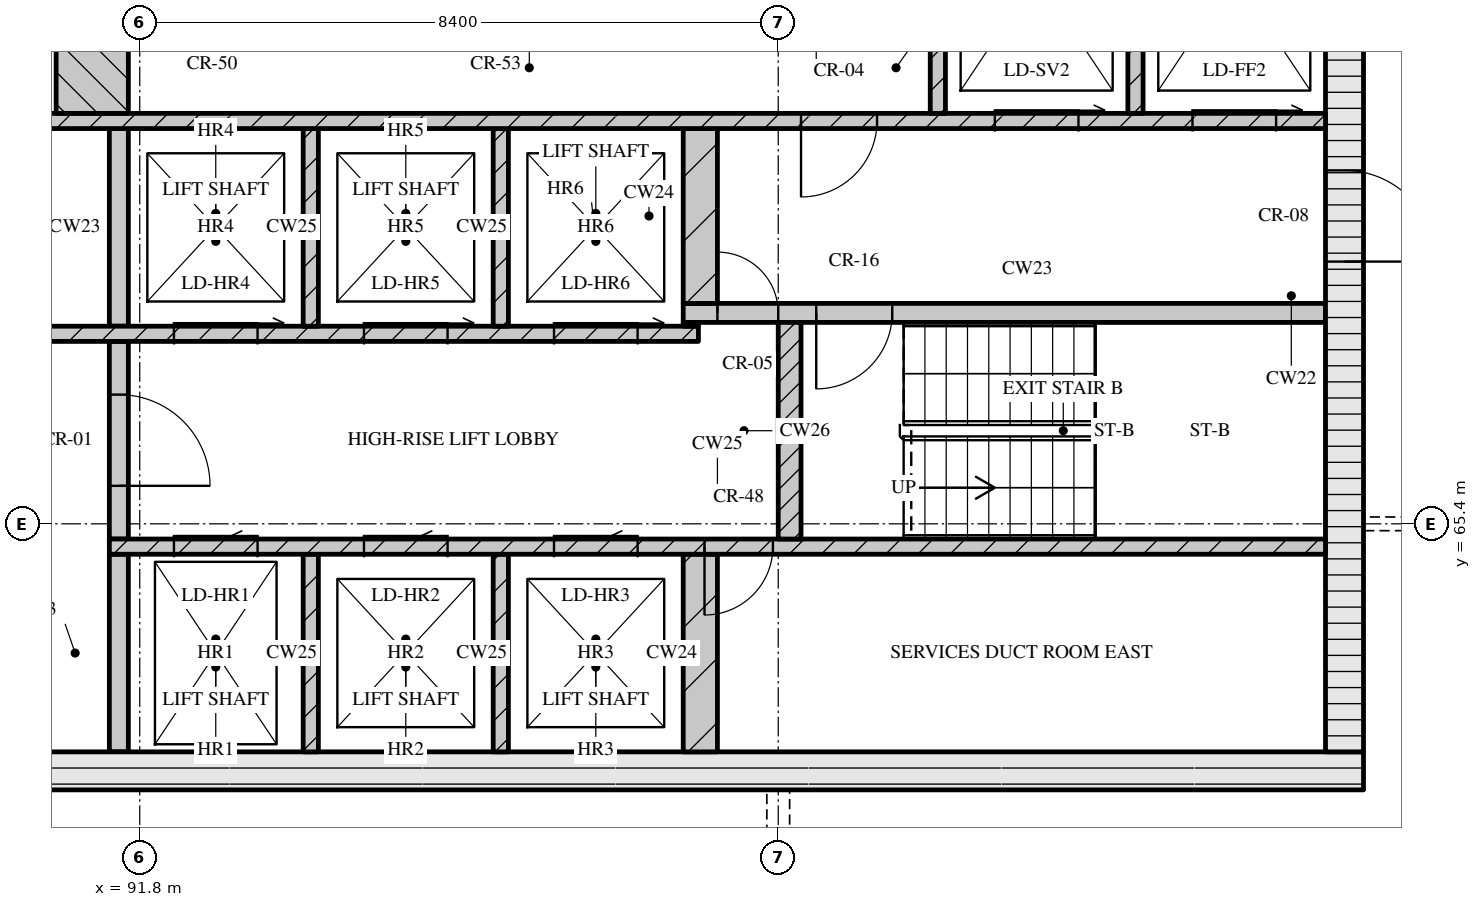
"""IFC4 building model, lengths in metres.
Left out: names, types, materials, properties, quantities, classifications, styles, units other than length and angle.
Written with IfcOpenShell. Run it as: python <this file> out.ifc"""

import sys

from ifc_helpers import new_model, si_unit, direction, frame, frame_2d, origin, place, context, subcontext, project, spatial, rectangle, extrude, element, fill, save


model = new_model("IFC4")
c1 = context("Model", 3, precision=1e-05, world=origin(), true_north=direction((0.0, 1.0)))
c2 = subcontext(c1, "Body", "Model", "MODEL_VIEW")
j1 = project(units=[si_unit("LENGTHUNIT", "METRE"), si_unit("PLANEANGLEUNIT", "RADIAN")], contexts=[c1])
p1 = place(None, origin())
s1 = spatial("IfcSite", under=j1, at=p1, CompositionType="ELEMENT")
p2 = place(p1, origin())
s2 = spatial("IfcBuilding", under=s1, at=p2, CompositionType="ELEMENT")
p3 = place(p2, frame((0.0, 0.0, 270.75)))
s3 = spatial("IfcBuildingStorey", under=s2, at=p3, CompositionType="ELEMENT", Elevation=270.75)
p4 = place(p3, frame((67.3, 62.15, 0.0), z_axis=(0.0, 0.0, 1.0), x_axis=(1.0, 0.0, 0.0)))
e1 = element("IfcWall", 1, at=p4, inside=s3, PredefinedType="SOLIDWALL", context=c2, shape_type="SweptSolid", body=[
    extrude(rectangle(XDim=40.6, YDim=0.5, at=frame_2d((20.3, 0.0))), origin(), (0.0, 0.0, 1.0), 3.32),
])
p5 = place(p4, frame((20.65, 0.0, 0.0)))
e2 = element("IfcOpeningElement", 2, at=p5, cuts=e1, PredefinedType="OPENING", context=c2, shape_type="SweptSolid", body=[
    extrude(rectangle(XDim=1.8, YDim=2.1, at=frame_2d((0.9, 1.05))), frame((0.0, 0.26, 0.0), z_axis=(0.0, -1.0, 0.0), x_axis=(1.0, 0.0, 0.0)), (0.0, 0.0, 1.0), 0.52),
])
p6 = place(p3, frame((107.65, 62.4, 0.0), z_axis=(0.0, 0.0, 1.0), x_axis=(0.0, 1.0, 0.0)))
e3 = element("IfcWall", 3, at=p6, inside=s3, PredefinedType="SOLIDWALL", context=c2, shape_type="SweptSolid", body=[
    extrude(rectangle(XDim=12.0, YDim=0.5, at=frame_2d((6.0, 0.0))), origin(), (0.0, 0.0, 1.0), 3.32),
])
p7 = place(p6, frame((6.45, 0.0, 0.0)))
e4 = element("IfcOpeningElement", 4, at=p7, cuts=e3, PredefinedType="OPENING", context=c2, shape_type="SweptSolid", body=[
    extrude(rectangle(XDim=1.2, YDim=2.1, at=frame_2d((0.6, 1.05))), frame((0.0, 0.26, 0.0), z_axis=(0.0, -1.0, 0.0), x_axis=(1.0, 0.0, 0.0)), (0.0, 0.0, 1.0), 0.52),
])
p8 = place(p3, frame((91.525, 62.4, 0.0), z_axis=(0.0, 0.0, 1.0), x_axis=(0.0, 1.0, 0.0)))
e5 = element("IfcWall", 5, at=p8, inside=s3, PredefinedType="SOLIDWALL", context=c2, shape_type="SweptSolid", body=[
    extrude(rectangle(XDim=2.6, YDim=0.25, at=frame_2d((1.3, 0.0))), origin(), (0.0, 0.0, 1.0), 3.32),
])
for number, where, z_axis, x_axis in (
    (6, (94.05, 62.4, 0.0), (0.0, 0.0, 1.0), (0.0, 1.0, 0.0)),
    (7, (96.55, 62.4, 0.0), (0.0, 0.0, 1.0), (0.0, 1.0, 0.0)),
):
    element("IfcWall", number, at=place(p3, frame(where, z_axis=z_axis, x_axis=x_axis)), inside=s3, PredefinedType="SOLIDWALL", context=c2, shape_type="SweptSolid", body=[
        extrude(rectangle(XDim=2.6, YDim=0.2, at=frame_2d((1.3, 0.0))), origin(), (0.0, 0.0, 1.0), 3.32),
    ])
p9 = place(p3, frame((99.175, 62.4, 0.0), z_axis=(0.0, 0.0, 1.0), x_axis=(0.0, 1.0, 0.0)))
e8 = element("IfcWall", 8, at=p9, inside=s3, PredefinedType="SOLIDWALL", context=c2, shape_type="SweptSolid", body=[
    extrude(rectangle(XDim=2.6, YDim=0.45, at=frame_2d((1.3, 0.0))), origin(), (0.0, 0.0, 1.0), 3.32),
])
p10 = place(p3, frame((91.4, 65.1, 0.0), z_axis=(0.0, 0.0, 1.0), x_axis=(1.0, 0.0, 0.0)))
e9 = element("IfcWall", 9, at=p10, inside=s3, PredefinedType="SOLIDWALL", context=c2, shape_type="SweptSolid", body=[
    extrude(rectangle(XDim=16.0, YDim=0.2, at=frame_2d((8.0, 0.0))), origin(), (0.0, 0.0, 1.0), 3.32),
])
p11 = place(p10, frame((0.85, 0.0, 0.0)))
e10 = element("IfcOpeningElement", 10, at=p11, cuts=e9, PredefinedType="OPENING", context=c2, shape_type="SweptSolid", body=[
    extrude(rectangle(XDim=1.1, YDim=2.1, at=frame_2d((0.55, 1.05))), frame((0.0, 0.11, 0.0), z_axis=(0.0, -1.0, 0.0), x_axis=(1.0, 0.0, 0.0)), (0.0, 0.0, 1.0), 0.22),
])
p12 = place(p10, frame((3.35, 0.0, 0.0)))
e11 = element("IfcOpeningElement", 11, at=p12, cuts=e9, PredefinedType="OPENING", context=c2, shape_type="SweptSolid", body=[
    extrude(rectangle(XDim=1.1, YDim=2.1, at=frame_2d((0.55, 1.05))), frame((0.0, 0.11, 0.0), z_axis=(0.0, -1.0, 0.0), x_axis=(1.0, 0.0, 0.0)), (0.0, 0.0, 1.0), 0.22),
])
p13 = place(p10, frame((5.85, 0.0, 0.0)))
e12 = element("IfcOpeningElement", 12, at=p13, cuts=e9, PredefinedType="OPENING", context=c2, shape_type="SweptSolid", body=[
    extrude(rectangle(XDim=1.1, YDim=2.1, at=frame_2d((0.55, 1.05))), frame((0.0, 0.11, 0.0), z_axis=(0.0, -1.0, 0.0), x_axis=(1.0, 0.0, 0.0)), (0.0, 0.0, 1.0), 0.22),
])
p14 = place(p10, frame((7.83, 0.0, 0.0)))
e13 = element("IfcOpeningElement", 13, at=p14, cuts=e9, PredefinedType="OPENING", context=c2, shape_type="SweptSolid", body=[
    extrude(rectangle(XDim=0.9, YDim=2.1, at=frame_2d((0.45, 1.05))), frame((0.0, 0.11, 0.0), z_axis=(0.0, -1.0, 0.0), x_axis=(1.0, 0.0, 0.0)), (0.0, 0.0, 1.0), 0.22),
])
p15 = place(p3, frame((91.525, 65.2, 0.0), z_axis=(0.0, 0.0, 1.0), x_axis=(0.0, 1.0, 0.0)))
e14 = element("IfcWall", 14, at=p15, inside=s3, PredefinedType="SOLIDWALL", context=c2, shape_type="SweptSolid", body=[
    extrude(rectangle(XDim=2.6, YDim=0.25, at=frame_2d((1.3, 0.0))), origin(), (0.0, 0.0, 1.0), 3.32),
])
p16 = place(p15, frame((0.7, 0.0, 0.0)))
e15 = element("IfcOpeningElement", 15, at=p16, cuts=e14, PredefinedType="OPENING", context=c2, shape_type="SweptSolid", body=[
    extrude(rectangle(XDim=1.2, YDim=2.1, at=frame_2d((0.6, 1.05))), frame((0.0, 0.135, 0.0), z_axis=(0.0, -1.0, 0.0), x_axis=(1.0, 0.0, 0.0)), (0.0, 0.0, 1.0), 0.27),
])
p17 = place(p3, frame((100.35, 65.2, 0.0), z_axis=(0.0, 0.0, 1.0), x_axis=(0.0, 1.0, 0.0)))
e16 = element("IfcWall", 16, at=p17, inside=s3, PredefinedType="SOLIDWALL", context=c2, shape_type="SweptSolid", body=[
    extrude(rectangle(XDim=2.85, YDim=0.3, at=frame_2d((1.425, 0.0))), origin(), (0.0, 0.0, 1.0), 3.32),
])
p18 = place(p3, frame((76.05, 67.9, 0.0), z_axis=(0.0, 0.0, 1.0), x_axis=(1.0, 0.0, 0.0)))
e17 = element("IfcWall", 17, at=p18, inside=s3, PredefinedType="SOLIDWALL", context=c2, shape_type="SweptSolid", body=[
    extrude(rectangle(XDim=23.1, YDim=0.2, at=frame_2d((11.55, 0.0))), origin(), (0.0, 0.0, 1.0), 3.32),
])
p19 = place(p18, frame((3.2, 0.0, 0.0)))
e18 = element("IfcOpeningElement", 18, at=p19, cuts=e17, PredefinedType="OPENING", context=c2, shape_type="SweptSolid", body=[
    extrude(rectangle(XDim=0.9, YDim=2.1, at=frame_2d((0.45, 1.05))), frame((0.0, 0.11, 0.0), z_axis=(0.0, -1.0, 0.0), x_axis=(1.0, 0.0, 0.0)), (0.0, 0.0, 1.0), 0.22),
])
p20 = place(p18, frame((9.7, 0.0, 0.0)))
e19 = element("IfcOpeningElement", 19, at=p20, cuts=e17, PredefinedType="OPENING", context=c2, shape_type="SweptSolid", body=[
    extrude(rectangle(XDim=0.9, YDim=2.1, at=frame_2d((0.45, 1.05))), frame((0.0, 0.11, 0.0), z_axis=(0.0, -1.0, 0.0), x_axis=(1.0, 0.0, 0.0)), (0.0, 0.0, 1.0), 0.22),
])
p21 = place(p18, frame((13.55, 0.0, 0.0)))
e20 = element("IfcOpeningElement", 20, at=p21, cuts=e17, PredefinedType="OPENING", context=c2, shape_type="SweptSolid", body=[
    extrude(rectangle(XDim=1.0, YDim=2.1, at=frame_2d((0.5, 1.05))), frame((0.0, 0.11, 0.0), z_axis=(0.0, -1.0, 0.0), x_axis=(1.0, 0.0, 0.0)), (0.0, 0.0, 1.0), 0.22),
])
p22 = place(p18, frame((16.2, 0.0, 0.0)))
e21 = element("IfcOpeningElement", 21, at=p22, cuts=e17, PredefinedType="OPENING", context=c2, shape_type="SweptSolid", body=[
    extrude(rectangle(XDim=1.1, YDim=2.1, at=frame_2d((0.55, 1.05))), frame((0.0, 0.11, 0.0), z_axis=(0.0, -1.0, 0.0), x_axis=(1.0, 0.0, 0.0)), (0.0, 0.0, 1.0), 0.22),
])
p23 = place(p18, frame((18.7, 0.0, 0.0)))
e22 = element("IfcOpeningElement", 22, at=p23, cuts=e17, PredefinedType="OPENING", context=c2, shape_type="SweptSolid", body=[
    extrude(rectangle(XDim=1.1, YDim=2.1, at=frame_2d((0.55, 1.05))), frame((0.0, 0.11, 0.0), z_axis=(0.0, -1.0, 0.0), x_axis=(1.0, 0.0, 0.0)), (0.0, 0.0, 1.0), 0.22),
])
p24 = place(p18, frame((21.2, 0.0, 0.0)))
e23 = element("IfcOpeningElement", 23, at=p24, cuts=e17, PredefinedType="OPENING", context=c2, shape_type="SweptSolid", body=[
    extrude(rectangle(XDim=1.1, YDim=2.1, at=frame_2d((0.55, 1.05))), frame((0.0, 0.11, 0.0), z_axis=(0.0, -1.0, 0.0), x_axis=(1.0, 0.0, 0.0)), (0.0, 0.0, 1.0), 0.22),
])
p25 = place(p3, frame((91.525, 68.0, 0.0), z_axis=(0.0, 0.0, 1.0), x_axis=(0.0, 1.0, 0.0)))
e24 = element("IfcWall", 24, at=p25, inside=s3, PredefinedType="SOLIDWALL", context=c2, shape_type="SweptSolid", body=[
    extrude(rectangle(XDim=2.6, YDim=0.25, at=frame_2d((1.3, 0.0))), origin(), (0.0, 0.0, 1.0), 3.32),
])
for number, where, z_axis, x_axis in (
    (25, (94.05, 68.0, 0.0), (0.0, 0.0, 1.0), (0.0, 1.0, 0.0)),
    (26, (96.55, 68.0, 0.0), (0.0, 0.0, 1.0), (0.0, 1.0, 0.0)),
):
    element("IfcWall", number, at=place(p3, frame(where, z_axis=z_axis, x_axis=x_axis)), inside=s3, PredefinedType="SOLIDWALL", context=c2, shape_type="SweptSolid", body=[
        extrude(rectangle(XDim=2.6, YDim=0.2, at=frame_2d((1.3, 0.0))), origin(), (0.0, 0.0, 1.0), 3.32),
    ])
p26 = place(p3, frame((98.95, 68.025, 0.0), z_axis=(0.0, 0.0, 1.0), x_axis=(1.0, 0.0, 0.0)))
e27 = element("IfcWall", 27, at=p26, inside=s3, PredefinedType="SOLIDWALL", context=c2, shape_type="SweptSolid", body=[
    extrude(rectangle(XDim=0.2, YDim=0.05, at=frame_2d((0.1, 0.0))), origin(), (0.0, 0.0, 1.0), 3.32),
])
p27 = place(p3, frame((98.95, 68.175, 0.0), z_axis=(0.0, 0.0, 1.0), x_axis=(1.0, 0.0, 0.0)))
e28 = element("IfcWall", 28, at=p27, inside=s3, PredefinedType="SOLIDWALL", context=c2, shape_type="SweptSolid", body=[
    extrude(rectangle(XDim=8.45, YDim=0.25, at=frame_2d((4.225, 0.0))), origin(), (0.0, 0.0, 1.0), 3.32),
])
p28 = place(p27, frame((0.45, 0.0, 0.0)))
e29 = element("IfcOpeningElement", 29, at=p28, cuts=e28, PredefinedType="OPENING", context=c2, shape_type="SweptSolid", body=[
    extrude(rectangle(XDim=0.8, YDim=2.1, at=frame_2d((0.4, 1.05))), frame((0.0, 0.135, 0.0), z_axis=(0.0, -1.0, 0.0), x_axis=(1.0, 0.0, 0.0)), (0.0, 0.0, 1.0), 0.27),
])
p29 = place(p27, frame((1.75, 0.0, 0.0)))
e30 = element("IfcOpeningElement", 30, at=p29, cuts=e28, PredefinedType="OPENING", context=c2, shape_type="SweptSolid", body=[
    extrude(rectangle(XDim=1.0, YDim=2.1, at=frame_2d((0.5, 1.05))), frame((0.0, 0.135, 0.0), z_axis=(0.0, -1.0, 0.0), x_axis=(1.0, 0.0, 0.0)), (0.0, 0.0, 1.0), 0.27),
])
p30 = place(p3, frame((99.175, 68.3, 0.0), z_axis=(0.0, 0.0, 1.0), x_axis=(0.0, 1.0, 0.0)))
e31 = element("IfcWall", 31, at=p30, inside=s3, PredefinedType="SOLIDWALL", context=c2, shape_type="SweptSolid", body=[
    extrude(rectangle(XDim=2.3, YDim=0.45, at=frame_2d((1.15, 0.0))), origin(), (0.0, 0.0, 1.0), 3.32),
])
p31 = place(p3, frame((67.8, 70.7, 0.0), z_axis=(0.0, 0.0, 1.0), x_axis=(1.0, 0.0, 0.0)))
e32 = element("IfcWall", 32, at=p31, inside=s3, PredefinedType="SOLIDWALL", context=c2, shape_type="SweptSolid", body=[
    extrude(rectangle(XDim=39.6, YDim=0.2, at=frame_2d((19.8, 0.0))), origin(), (0.0, 0.0, 1.0), 3.32),
])
p32 = place(p31, frame((0.65, 0.0, 0.0)))
e33 = element("IfcOpeningElement", 33, at=p32, cuts=e32, PredefinedType="OPENING", context=c2, shape_type="SweptSolid", body=[
    extrude(rectangle(XDim=1.1, YDim=2.1, at=frame_2d((0.55, 1.05))), frame((0.0, 0.11, 0.0), z_axis=(0.0, -1.0, 0.0), x_axis=(1.0, 0.0, 0.0)), (0.0, 0.0, 1.0), 0.22),
])
p33 = place(p31, frame((3.25, 0.0, 0.0)))
e34 = element("IfcOpeningElement", 34, at=p33, cuts=e32, PredefinedType="OPENING", context=c2, shape_type="SweptSolid", body=[
    extrude(rectangle(XDim=1.1, YDim=2.1, at=frame_2d((0.55, 1.05))), frame((0.0, 0.11, 0.0), z_axis=(0.0, -1.0, 0.0), x_axis=(1.0, 0.0, 0.0)), (0.0, 0.0, 1.0), 0.22),
])
p34 = place(p31, frame((5.9, 0.0, 0.0)))
e35 = element("IfcOpeningElement", 35, at=p34, cuts=e32, PredefinedType="OPENING", context=c2, shape_type="SweptSolid", body=[
    extrude(rectangle(XDim=1.0, YDim=2.1, at=frame_2d((0.5, 1.05))), frame((0.0, 0.11, 0.0), z_axis=(0.0, -1.0, 0.0), x_axis=(1.0, 0.0, 0.0)), (0.0, 0.0, 1.0), 0.22),
])
p35 = place(p31, frame((21.7, 0.0, 0.0)))
e36 = element("IfcOpeningElement", 36, at=p35, cuts=e32, PredefinedType="OPENING", context=c2, shape_type="SweptSolid", body=[
    extrude(rectangle(XDim=1.0, YDim=2.1, at=frame_2d((0.5, 1.05))), frame((0.0, 0.11, 0.0), z_axis=(0.0, -1.0, 0.0), x_axis=(1.0, 0.0, 0.0)), (0.0, 0.0, 1.0), 0.22),
])
p36 = place(p31, frame((32.7, 0.0, 0.0)))
e37 = element("IfcOpeningElement", 37, at=p36, cuts=e32, PredefinedType="OPENING", context=c2, shape_type="SweptSolid", body=[
    extrude(rectangle(XDim=1.0, YDim=2.1, at=frame_2d((0.5, 1.05))), frame((0.0, 0.11, 0.0), z_axis=(0.0, -1.0, 0.0), x_axis=(1.0, 0.0, 0.0)), (0.0, 0.0, 1.0), 0.22),
])
p37 = place(p31, frame((35.25, 0.0, 0.0)))
e38 = element("IfcOpeningElement", 38, at=p37, cuts=e32, PredefinedType="OPENING", context=c2, shape_type="SweptSolid", body=[
    extrude(rectangle(XDim=1.1, YDim=2.1, at=frame_2d((0.55, 1.05))), frame((0.0, 0.11, 0.0), z_axis=(0.0, -1.0, 0.0), x_axis=(1.0, 0.0, 0.0)), (0.0, 0.0, 1.0), 0.22),
])
p38 = place(p31, frame((37.85, 0.0, 0.0)))
e39 = element("IfcOpeningElement", 39, at=p38, cuts=e32, PredefinedType="OPENING", context=c2, shape_type="SweptSolid", body=[
    extrude(rectangle(XDim=1.1, YDim=2.1, at=frame_2d((0.55, 1.05))), frame((0.0, 0.11, 0.0), z_axis=(0.0, -1.0, 0.0), x_axis=(1.0, 0.0, 0.0)), (0.0, 0.0, 1.0), 0.22),
])
p39 = place(p3, frame((91.175, 70.8, 0.0), z_axis=(0.0, 0.0, 1.0), x_axis=(0.0, 1.0, 0.0)))
e40 = element("IfcWall", 40, at=p39, inside=s3, PredefinedType="SOLIDWALL", context=c2, shape_type="SweptSolid", body=[
    extrude(rectangle(XDim=1.2, YDim=0.95, at=frame_2d((0.6, 0.0))), origin(), (0.0, 0.0, 1.0), 3.32),
])
p40 = place(p3, frame((102.3, 70.8, 0.0), z_axis=(0.0, 0.0, 1.0), x_axis=(0.0, 1.0, 0.0)))
e41 = element("IfcWall", 41, at=p40, inside=s3, PredefinedType="SOLIDWALL", context=c2, shape_type="SweptSolid", body=[
    extrude(rectangle(XDim=1.2, YDim=0.2, at=frame_2d((0.6, 0.0))), origin(), (0.0, 0.0, 1.0), 3.32),
])
p41 = place(p3, frame((104.9, 70.8, 0.0), z_axis=(0.0, 0.0, 1.0), x_axis=(0.0, 1.0, 0.0)))
e42 = element("IfcWall", 42, at=p41, inside=s3, PredefinedType="SOLIDWALL", context=c2, shape_type="SweptSolid", body=[
    extrude(rectangle(XDim=3.6, YDim=0.2, at=frame_2d((1.8, 0.0))), origin(), (0.0, 0.0, 1.0), 3.32),
])
p42 = place(p11, origin())
e43 = element("IfcDoor", 43, at=p42, inside=s3, OperationType="SLIDING_TO_LEFT", PredefinedType="DOOR", context=c2, shape_type="SweptSolid", body=[
    extrude(rectangle(XDim=1.1, YDim=2.1, at=frame_2d((0.55, 1.05))), frame((0.0, 0.025, 0.0), z_axis=(0.0, -1.0, 0.0), x_axis=(1.0, 0.0, 0.0)), (0.0, 0.0, 1.0), 0.05),
])
fill(e10, e43)
p43 = place(p12, origin())
e44 = element("IfcDoor", 44, at=p43, inside=s3, OperationType="SLIDING_TO_LEFT", PredefinedType="DOOR", context=c2, shape_type="SweptSolid", body=[
    extrude(rectangle(XDim=1.1, YDim=2.1, at=frame_2d((0.55, 1.05))), frame((0.0, 0.025, 0.0), z_axis=(0.0, -1.0, 0.0), x_axis=(1.0, 0.0, 0.0)), (0.0, 0.0, 1.0), 0.05),
])
fill(e11, e44)
p44 = place(p13, origin())
e45 = element("IfcDoor", 45, at=p44, inside=s3, OperationType="SLIDING_TO_LEFT", PredefinedType="DOOR", context=c2, shape_type="SweptSolid", body=[
    extrude(rectangle(XDim=1.1, YDim=2.1, at=frame_2d((0.55, 1.05))), frame((0.0, 0.025, 0.0), z_axis=(0.0, -1.0, 0.0), x_axis=(1.0, 0.0, 0.0)), (0.0, 0.0, 1.0), 0.05),
])
fill(e12, e45)
p45 = place(p14, origin())
e46 = element("IfcDoor", 46, at=p45, inside=s3, OperationType="SINGLE_SWING_RIGHT", PredefinedType="DOOR", context=c2, shape_type="SweptSolid", body=[
    extrude(rectangle(XDim=0.9, YDim=2.1, at=frame_2d((0.45, 1.05))), frame((0.0, 0.025, 0.0), z_axis=(0.0, -1.0, 0.0), x_axis=(1.0, 0.0, 0.0)), (0.0, 0.0, 1.0), 0.05),
])
fill(e13, e46)
p46 = place(p16, origin())
e47 = element("IfcDoor", 47, at=p46, inside=s3, OperationType="SINGLE_SWING_RIGHT", PredefinedType="DOOR", context=c2, shape_type="SweptSolid", body=[
    extrude(rectangle(XDim=1.2, YDim=2.1, at=frame_2d((0.6, 1.05))), frame((0.0, 0.025, 0.0), z_axis=(0.0, -1.0, 0.0), x_axis=(1.0, 0.0, 0.0)), (0.0, 0.0, 1.0), 0.05),
])
fill(e15, e47)
p47 = place(p22, origin())
e48 = element("IfcDoor", 48, at=p47, inside=s3, OperationType="SLIDING_TO_RIGHT", PredefinedType="DOOR", context=c2, shape_type="SweptSolid", body=[
    extrude(rectangle(XDim=1.1, YDim=2.1, at=frame_2d((0.55, 1.05))), frame((0.0, 0.025, 0.0), z_axis=(0.0, -1.0, 0.0), x_axis=(1.0, 0.0, 0.0)), (0.0, 0.0, 1.0), 0.05),
])
fill(e21, e48)
p48 = place(p23, origin())
e49 = element("IfcDoor", 49, at=p48, inside=s3, OperationType="SLIDING_TO_RIGHT", PredefinedType="DOOR", context=c2, shape_type="SweptSolid", body=[
    extrude(rectangle(XDim=1.1, YDim=2.1, at=frame_2d((0.55, 1.05))), frame((0.0, 0.025, 0.0), z_axis=(0.0, -1.0, 0.0), x_axis=(1.0, 0.0, 0.0)), (0.0, 0.0, 1.0), 0.05),
])
fill(e22, e49)
p49 = place(p24, origin())
e50 = element("IfcDoor", 50, at=p49, inside=s3, OperationType="SLIDING_TO_RIGHT", PredefinedType="DOOR", context=c2, shape_type="SweptSolid", body=[
    extrude(rectangle(XDim=1.1, YDim=2.1, at=frame_2d((0.55, 1.05))), frame((0.0, 0.025, 0.0), z_axis=(0.0, -1.0, 0.0), x_axis=(1.0, 0.0, 0.0)), (0.0, 0.0, 1.0), 0.05),
])
fill(e23, e50)
p50 = place(p28, origin())
e51 = element("IfcDoor", 51, at=p50, inside=s3, OperationType="SINGLE_SWING_LEFT", PredefinedType="DOOR", context=c2, shape_type="SweptSolid", body=[
    extrude(rectangle(XDim=0.8, YDim=2.1, at=frame_2d((0.4, 1.05))), frame((0.0, 0.025, 0.0), z_axis=(0.0, -1.0, 0.0), x_axis=(1.0, 0.0, 0.0)), (0.0, 0.0, 1.0), 0.05),
])
fill(e29, e51)
p51 = place(p29, origin())
e52 = element("IfcDoor", 52, at=p51, inside=s3, OperationType="SINGLE_SWING_RIGHT", PredefinedType="DOOR", context=c2, shape_type="SweptSolid", body=[
    extrude(rectangle(XDim=1.0, YDim=2.1, at=frame_2d((0.5, 1.05))), frame((0.0, 0.025, 0.0), z_axis=(0.0, -1.0, 0.0), x_axis=(1.0, 0.0, 0.0)), (0.0, 0.0, 1.0), 0.05),
])
fill(e30, e52)
p52 = place(p7, origin())
e53 = element("IfcDoor", 53, at=p52, inside=s3, OperationType="SINGLE_SWING_RIGHT", PredefinedType="DOOR", context=c2, shape_type="SweptSolid", body=[
    extrude(rectangle(XDim=1.2, YDim=2.1, at=frame_2d((0.6, 1.05))), frame((0.0, 0.025, 0.0), z_axis=(0.0, -1.0, 0.0), x_axis=(1.0, 0.0, 0.0)), (0.0, 0.0, 1.0), 0.05),
])
fill(e4, e53)
p53 = place(p36, origin())
e54 = element("IfcDoor", 54, at=p53, inside=s3, OperationType="SINGLE_SWING_RIGHT", PredefinedType="DOOR", context=c2, shape_type="SweptSolid", body=[
    extrude(rectangle(XDim=1.0, YDim=2.1, at=frame_2d((0.5, 1.05))), frame((0.0, 0.025, 0.0), z_axis=(0.0, -1.0, 0.0), x_axis=(1.0, 0.0, 0.0)), (0.0, 0.0, 1.0), 0.05),
])
fill(e37, e54)
p54 = place(p37, origin())
e55 = element("IfcDoor", 55, at=p54, inside=s3, OperationType="SLIDING_TO_RIGHT", PredefinedType="DOOR", context=c2, shape_type="SweptSolid", body=[
    extrude(rectangle(XDim=1.1, YDim=2.1, at=frame_2d((0.55, 1.05))), frame((0.0, 0.025, 0.0), z_axis=(0.0, -1.0, 0.0), x_axis=(1.0, 0.0, 0.0)), (0.0, 0.0, 1.0), 0.05),
])
fill(e38, e55)
p55 = place(p38, origin())
e56 = element("IfcDoor", 56, at=p55, inside=s3, OperationType="SLIDING_TO_RIGHT", PredefinedType="DOOR", context=c2, shape_type="SweptSolid", body=[
    extrude(rectangle(XDim=1.1, YDim=2.1, at=frame_2d((0.55, 1.05))), frame((0.0, 0.025, 0.0), z_axis=(0.0, -1.0, 0.0), x_axis=(1.0, 0.0, 0.0)), (0.0, 0.0, 1.0), 0.05),
])
fill(e39, e56)
save(model, sys.argv[1])
